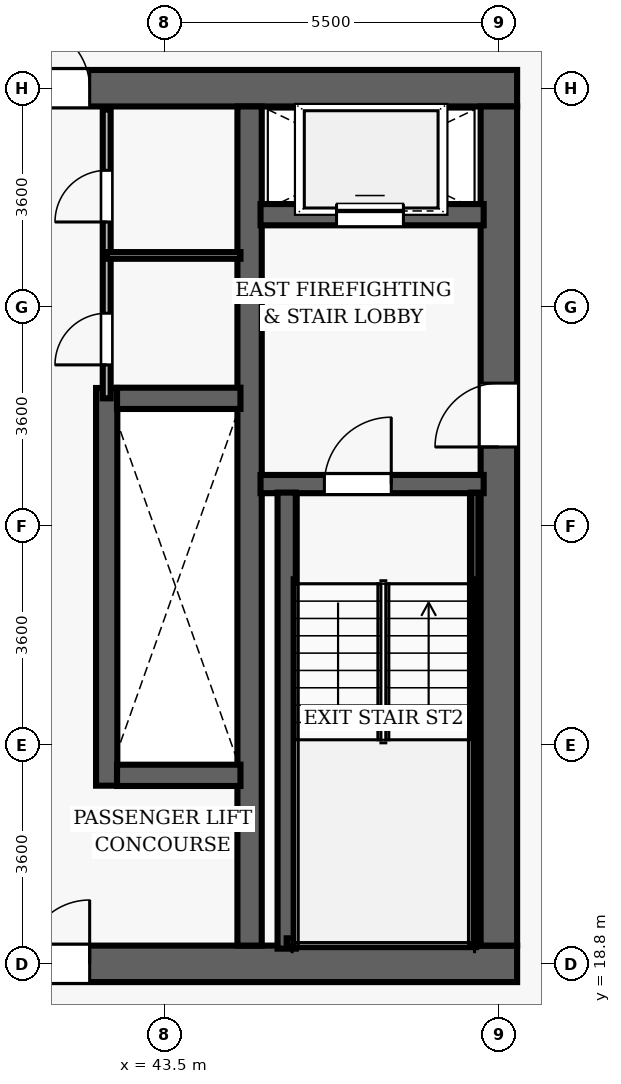
"""IFC4 building model, lengths in metres.
Left out: names, types, materials, properties, quantities, classifications, styles, units other than length and angle.
Written with IfcOpenShell. Run it as: python <this file> out.ifc"""

import sys

from ifc_helpers import new_model, si_unit, direction, frame, frame_2d, origin, place, context, subcontext, project, spatial, rectangle, extrude, element, fill, save


model = new_model("IFC4")
c1 = context("Model", 3, precision=1e-05, world=origin(), true_north=direction((0.0, 1.0)))
c2 = subcontext(c1, "Body", "Model", "MODEL_VIEW")
j1 = project(units=[si_unit("LENGTHUNIT", "METRE"), si_unit("PLANEANGLEUNIT", "RADIAN")], contexts=[c1])
p1 = place(None, origin())
s1 = spatial("IfcSite", under=j1, at=p1, CompositionType="ELEMENT")
p2 = place(p1, origin())
s2 = spatial("IfcBuilding", under=s1, at=p2, CompositionType="ELEMENT")
p3 = place(p2, frame((0.0, 0.0, 44.9)))
s3 = spatial("IfcBuildingStorey", under=s2, at=p3, CompositionType="ELEMENT", Elevation=44.9)
p4 = place(p3, frame((26.7, 18.8, 0.0), z_axis=(0.0, 0.0, 1.0), x_axis=(1.0, 0.0, 0.0)))
e1 = element("IfcWall", 1, at=p4, inside=s3, PredefinedType="SHEAR", context=c2, shape_type="SweptSolid", body=[
    extrude(rectangle(XDim=22.6, YDim=0.6, at=frame_2d((11.3, 0.0))), origin(), (0.0, 0.0, 1.0), 3.5),
])
p5 = place(p4, frame((14.52, 0.0, 0.0)))
e2 = element("IfcOpeningElement", 2, at=p5, cuts=e1, PredefinedType="OPENING", context=c2, shape_type="SweptSolid", body=[
    extrude(rectangle(XDim=1.05, YDim=2.15, at=frame_2d((0.525, 1.075))), frame((0.0, 0.31, 0.0), z_axis=(0.0, -1.0, 0.0), x_axis=(1.0, 0.0, 0.0)), (0.0, 0.0, 1.0), 0.62),
])
p6 = place(p3, frame((26.7, 33.2, 0.0), z_axis=(0.0, 0.0, 1.0), x_axis=(1.0, 0.0, 0.0)))
e3 = element("IfcWall", 3, at=p6, inside=s3, PredefinedType="SHEAR", context=c2, shape_type="SweptSolid", body=[
    extrude(rectangle(XDim=22.6, YDim=0.6, at=frame_2d((11.3, 0.0))), origin(), (0.0, 0.0, 1.0), 3.5),
])
p7 = place(p6, frame((4.62, 0.0, 0.0)))
e4 = element("IfcOpeningElement", 4, at=p7, cuts=e3, PredefinedType="OPENING", context=c2, shape_type="SweptSolid", body=[
    extrude(rectangle(XDim=1.05, YDim=2.15, at=frame_2d((0.525, 1.075))), frame((0.0, 0.31, 0.0), z_axis=(0.0, -1.0, 0.0), x_axis=(1.0, 0.0, 0.0)), (0.0, 0.0, 1.0), 0.62),
])
p8 = place(p6, frame((14.52, 0.0, 0.0)))
e5 = element("IfcOpeningElement", 5, at=p8, cuts=e3, PredefinedType="OPENING", context=c2, shape_type="SweptSolid", body=[
    extrude(rectangle(XDim=1.05, YDim=2.15, at=frame_2d((0.525, 1.075))), frame((0.0, 0.31, 0.0), z_axis=(0.0, -1.0, 0.0), x_axis=(1.0, 0.0, 0.0)), (0.0, 0.0, 1.0), 0.62),
])
p9 = place(p3, frame((49.0, 19.1, 0.0), z_axis=(0.0, 0.0, 1.0), x_axis=(0.0, 1.0, 0.0)))
e6 = element("IfcWall", 6, at=p9, inside=s3, PredefinedType="SHEAR", context=c2, shape_type="SweptSolid", body=[
    extrude(rectangle(XDim=13.8, YDim=0.6, at=frame_2d((6.9, 0.0))), origin(), (0.0, 0.0, 1.0), 3.5),
])
p10 = place(p9, frame((8.2, 0.0, 0.0)))
e7 = element("IfcOpeningElement", 7, at=p10, cuts=e6, PredefinedType="OPENING", context=c2, shape_type="SweptSolid", body=[
    extrude(rectangle(XDim=1.05, YDim=2.15, at=frame_2d((0.525, 1.075))), frame((0.0, 0.31, 0.0), z_axis=(0.0, -1.0, 0.0), x_axis=(1.0, 0.0, 0.0)), (0.0, 0.0, 1.0), 0.62),
])
p11 = place(p3, frame((44.9, 19.1, 0.0), z_axis=(0.0, 0.0, 1.0), x_axis=(0.0, 1.0, 0.0)))
e8 = element("IfcWall", 8, at=p11, inside=s3, PredefinedType="SHEAR", context=c2, shape_type="SweptSolid", body=[
    extrude(rectangle(XDim=13.8, YDim=0.4, at=frame_2d((6.9, 0.0))), origin(), (0.0, 0.0, 1.0), 3.5),
])
p12 = place(p3, frame((45.08, 26.69, 0.0), z_axis=(0.0, 0.0, 1.0), x_axis=(1.0, 0.0, 0.0)))
e9 = element("IfcWall", 9, at=p12, inside=s3, PredefinedType="SHEAR", context=c2, shape_type="SweptSolid", body=[
    extrude(rectangle(XDim=3.67, YDim=0.3, at=frame_2d((1.835, 0.0))), origin(), (0.0, 0.0, 1.0), 3.5),
])
p13 = place(p12, frame((1.05, 0.0, 0.0)))
e10 = element("IfcOpeningElement", 10, at=p13, cuts=e9, PredefinedType="OPENING", context=c2, shape_type="SweptSolid", body=[
    extrude(rectangle(XDim=1.1, YDim=2.15, at=frame_2d((0.55, 1.075))), frame((0.0, 0.16, 0.0), z_axis=(0.0, -1.0, 0.0), x_axis=(1.0, 0.0, 0.0)), (0.0, 0.0, 1.0), 0.32),
])
p14 = place(p3, frame((45.51, 19.05, 0.0), z_axis=(0.0, 0.0, 1.0), x_axis=(0.0, 1.0, 0.0)))
e11 = element("IfcWall", 11, at=p14, inside=s3, PredefinedType="SHEAR", context=c2, shape_type="SweptSolid", body=[
    extrude(rectangle(XDim=7.5, YDim=0.3, at=frame_2d((3.75, 0.0))), origin(), (0.0, 0.0, 1.0), 3.5),
])
p15 = place(p3, frame((48.605, 19.1, 0.0), z_axis=(0.0, 0.0, 1.0), x_axis=(0.0, 1.0, 0.0)))
e12 = element("IfcWall", 12, at=p15, inside=s3, PredefinedType="SHEAR", context=c2, shape_type="SweptSolid", body=[
    extrude(rectangle(XDim=7.45, YDim=0.12, at=frame_2d((3.725, 0.0))), origin(), (0.0, 0.0, 1.0), 3.5),
])
p16 = place(p3, frame((45.51, 19.16, 0.0), z_axis=(0.0, 0.0, 1.0), x_axis=(1.0, 0.0, 0.0)))
e13 = element("IfcWall", 13, at=p16, inside=s3, PredefinedType="SHEAR", context=c2, shape_type="SweptSolid", body=[
    extrude(rectangle(XDim=3.095, YDim=0.12, at=frame_2d((1.547, 0.0))), origin(), (0.0, 0.0, 1.0), 3.5),
])
p17 = place(p3, frame((45.08, 31.12, 0.0), z_axis=(0.0, 0.0, 1.0), x_axis=(1.0, 0.0, 0.0)))
e14 = element("IfcWall", 14, at=p17, inside=s3, PredefinedType="SHEAR", context=c2, shape_type="SweptSolid", body=[
    extrude(rectangle(XDim=3.67, YDim=0.35, at=frame_2d((1.835, 0.0))), origin(), (0.0, 0.0, 1.0), 2.6),
])
p18 = place(p17, frame((1.25, 0.0, 0.0)))
e15 = element("IfcOpeningElement", 15, at=p18, cuts=e14, PredefinedType="OPENING", context=c2, shape_type="SweptSolid", body=[
    extrude(rectangle(XDim=1.1, YDim=2.15, at=frame_2d((0.55, 1.075))), frame((0.0, 0.185, 0.0), z_axis=(0.0, -1.0, 0.0), x_axis=(1.0, 0.0, 0.0)), (0.0, 0.0, 1.0), 0.37),
])
p19 = place(p3, frame((42.55, 21.73, 0.0), z_axis=(0.0, 0.0, 1.0), x_axis=(0.0, 1.0, 0.0)))
e16 = element("IfcWall", 16, at=p19, inside=s3, PredefinedType="SHEAR", context=c2, shape_type="SweptSolid", body=[
    extrude(rectangle(XDim=6.54, YDim=0.35, at=frame_2d((3.27, 0.0))), origin(), (0.0, 0.0, 1.0), 2.6),
])
for number, where, z_axis, x_axis in (
    (17, (42.72, 21.9, 0.0), (0.0, 0.0, 1.0), (1.0, 0.0, 0.0)),
    (18, (42.72, 28.1, 0.0), (0.0, 0.0, 1.0), (1.0, 0.0, 0.0)),
):
    element("IfcWall", number, at=place(p3, frame(where, z_axis=z_axis, x_axis=x_axis)), inside=s3, PredefinedType="SHEAR", context=c2, shape_type="SweptSolid", body=[
        extrude(rectangle(XDim=2.03, YDim=0.35, at=frame_2d((1.015, 0.0))), origin(), (0.0, 0.0, 1.0), 2.6),
    ])
p20 = place(p3, frame((42.55, 28.1, 0.0), z_axis=(0.0, 0.0, 1.0), x_axis=(0.0, 1.0, 0.0)))
e19 = element("IfcWall", 19, at=p20, inside=s3, PredefinedType="PARTITIONING", context=c2, shape_type="SweptSolid", body=[
    extrude(rectangle(XDim=4.75, YDim=0.13, at=frame_2d((2.375, 0.0))), origin(), (0.0, 0.0, 1.0), 2.6),
])
p21 = place(p20, frame((0.55, 0.0, 0.0)))
e20 = element("IfcOpeningElement", 20, at=p21, cuts=e19, PredefinedType="OPENING", context=c2, shape_type="SweptSolid", body=[
    extrude(rectangle(XDim=0.85, YDim=2.1, at=frame_2d((0.425, 1.05))), frame((0.0, 0.075, 0.0), z_axis=(0.0, -1.0, 0.0), x_axis=(1.0, 0.0, 0.0)), (0.0, 0.0, 1.0), 0.15),
])
p22 = place(p20, frame((2.9, 0.0, 0.0)))
e21 = element("IfcOpeningElement", 21, at=p22, cuts=e19, PredefinedType="OPENING", context=c2, shape_type="SweptSolid", body=[
    extrude(rectangle(XDim=0.85, YDim=2.1, at=frame_2d((0.425, 1.05))), frame((0.0, 0.075, 0.0), z_axis=(0.0, -1.0, 0.0), x_axis=(1.0, 0.0, 0.0)), (0.0, 0.0, 1.0), 0.15),
])
p23 = place(p3, frame((42.55, 30.45, 0.0), z_axis=(0.0, 0.0, 1.0), x_axis=(1.0, 0.0, 0.0)))
e22 = element("IfcWall", 22, at=p23, inside=s3, PredefinedType="PARTITIONING", context=c2, shape_type="SweptSolid", body=[
    extrude(rectangle(XDim=2.2, YDim=0.11, at=frame_2d((1.1, 0.0))), origin(), (0.0, 0.0, 1.0), 2.6),
])
p24 = place(p13, origin())
e23 = element("IfcDoor", 23, at=p24, inside=s3, OperationType="SINGLE_SWING_RIGHT", PredefinedType="DOOR", context=c2, shape_type="SweptSolid", body=[
    extrude(rectangle(XDim=1.1, YDim=2.15, at=frame_2d((0.55, 1.075))), frame((0.0, 0.025, 0.0), z_axis=(0.0, -1.0, 0.0), x_axis=(1.0, 0.0, 0.0)), (0.0, 0.0, 1.0), 0.05),
])
fill(e10, e23)
p25 = place(p10, origin())
e24 = element("IfcDoor", 24, at=p25, inside=s3, OperationType="SINGLE_SWING_LEFT", PredefinedType="DOOR", context=c2, shape_type="SweptSolid", body=[
    extrude(rectangle(XDim=1.05, YDim=2.15, at=frame_2d((0.525, 1.075))), frame((0.0, 0.025, 0.0), z_axis=(0.0, -1.0, 0.0), x_axis=(1.0, 0.0, 0.0)), (0.0, 0.0, 1.0), 0.05),
])
fill(e7, e24)
p26 = place(p8, origin())
e25 = element("IfcDoor", 25, at=p26, inside=s3, OperationType="SINGLE_SWING_LEFT", PredefinedType="DOOR", context=c2, shape_type="SweptSolid", body=[
    extrude(rectangle(XDim=1.05, YDim=2.15, at=frame_2d((0.525, 1.075))), frame((0.0, 0.025, 0.0), z_axis=(0.0, -1.0, 0.0), x_axis=(1.0, 0.0, 0.0)), (0.0, 0.0, 1.0), 0.05),
])
fill(e5, e25)
p27 = place(p5, origin())
e26 = element("IfcDoor", 26, at=p27, inside=s3, OperationType="SINGLE_SWING_RIGHT", PredefinedType="DOOR", context=c2, shape_type="SweptSolid", body=[
    extrude(rectangle(XDim=1.05, YDim=2.15, at=frame_2d((0.525, 1.075))), frame((0.0, 0.025, 0.0), z_axis=(0.0, -1.0, 0.0), x_axis=(1.0, 0.0, 0.0)), (0.0, 0.0, 1.0), 0.05),
])
fill(e2, e26)
p28 = place(p21, origin())
e27 = element("IfcDoor", 27, at=p28, inside=s3, OperationType="SINGLE_SWING_LEFT", PredefinedType="DOOR", context=c2, shape_type="SweptSolid", body=[
    extrude(rectangle(XDim=0.85, YDim=2.1, at=frame_2d((0.425, 1.05))), frame((0.0, 0.025, 0.0), z_axis=(0.0, -1.0, 0.0), x_axis=(1.0, 0.0, 0.0)), (0.0, 0.0, 1.0), 0.05),
])
fill(e20, e27)
p29 = place(p22, origin())
e28 = element("IfcDoor", 28, at=p29, inside=s3, OperationType="SINGLE_SWING_LEFT", PredefinedType="DOOR", context=c2, shape_type="SweptSolid", body=[
    extrude(rectangle(XDim=0.85, YDim=2.1, at=frame_2d((0.425, 1.05))), frame((0.0, 0.025, 0.0), z_axis=(0.0, -1.0, 0.0), x_axis=(1.0, 0.0, 0.0)), (0.0, 0.0, 1.0), 0.05),
])
fill(e21, e28)
p30 = place(p18, origin())
e29 = element("IfcDoor", 29, at=p30, inside=s3, OperationType="SLIDING_TO_LEFT", PredefinedType="DOOR", context=c2, shape_type="SweptSolid", body=[
    extrude(rectangle(XDim=1.1, YDim=2.15, at=frame_2d((0.55, 1.075))), frame((0.0, 0.025, 0.0), z_axis=(0.0, -1.0, 0.0), x_axis=(1.0, 0.0, 0.0)), (0.0, 0.0, 1.0), 0.05),
])
fill(e15, e29)
save(model, sys.argv[1])
